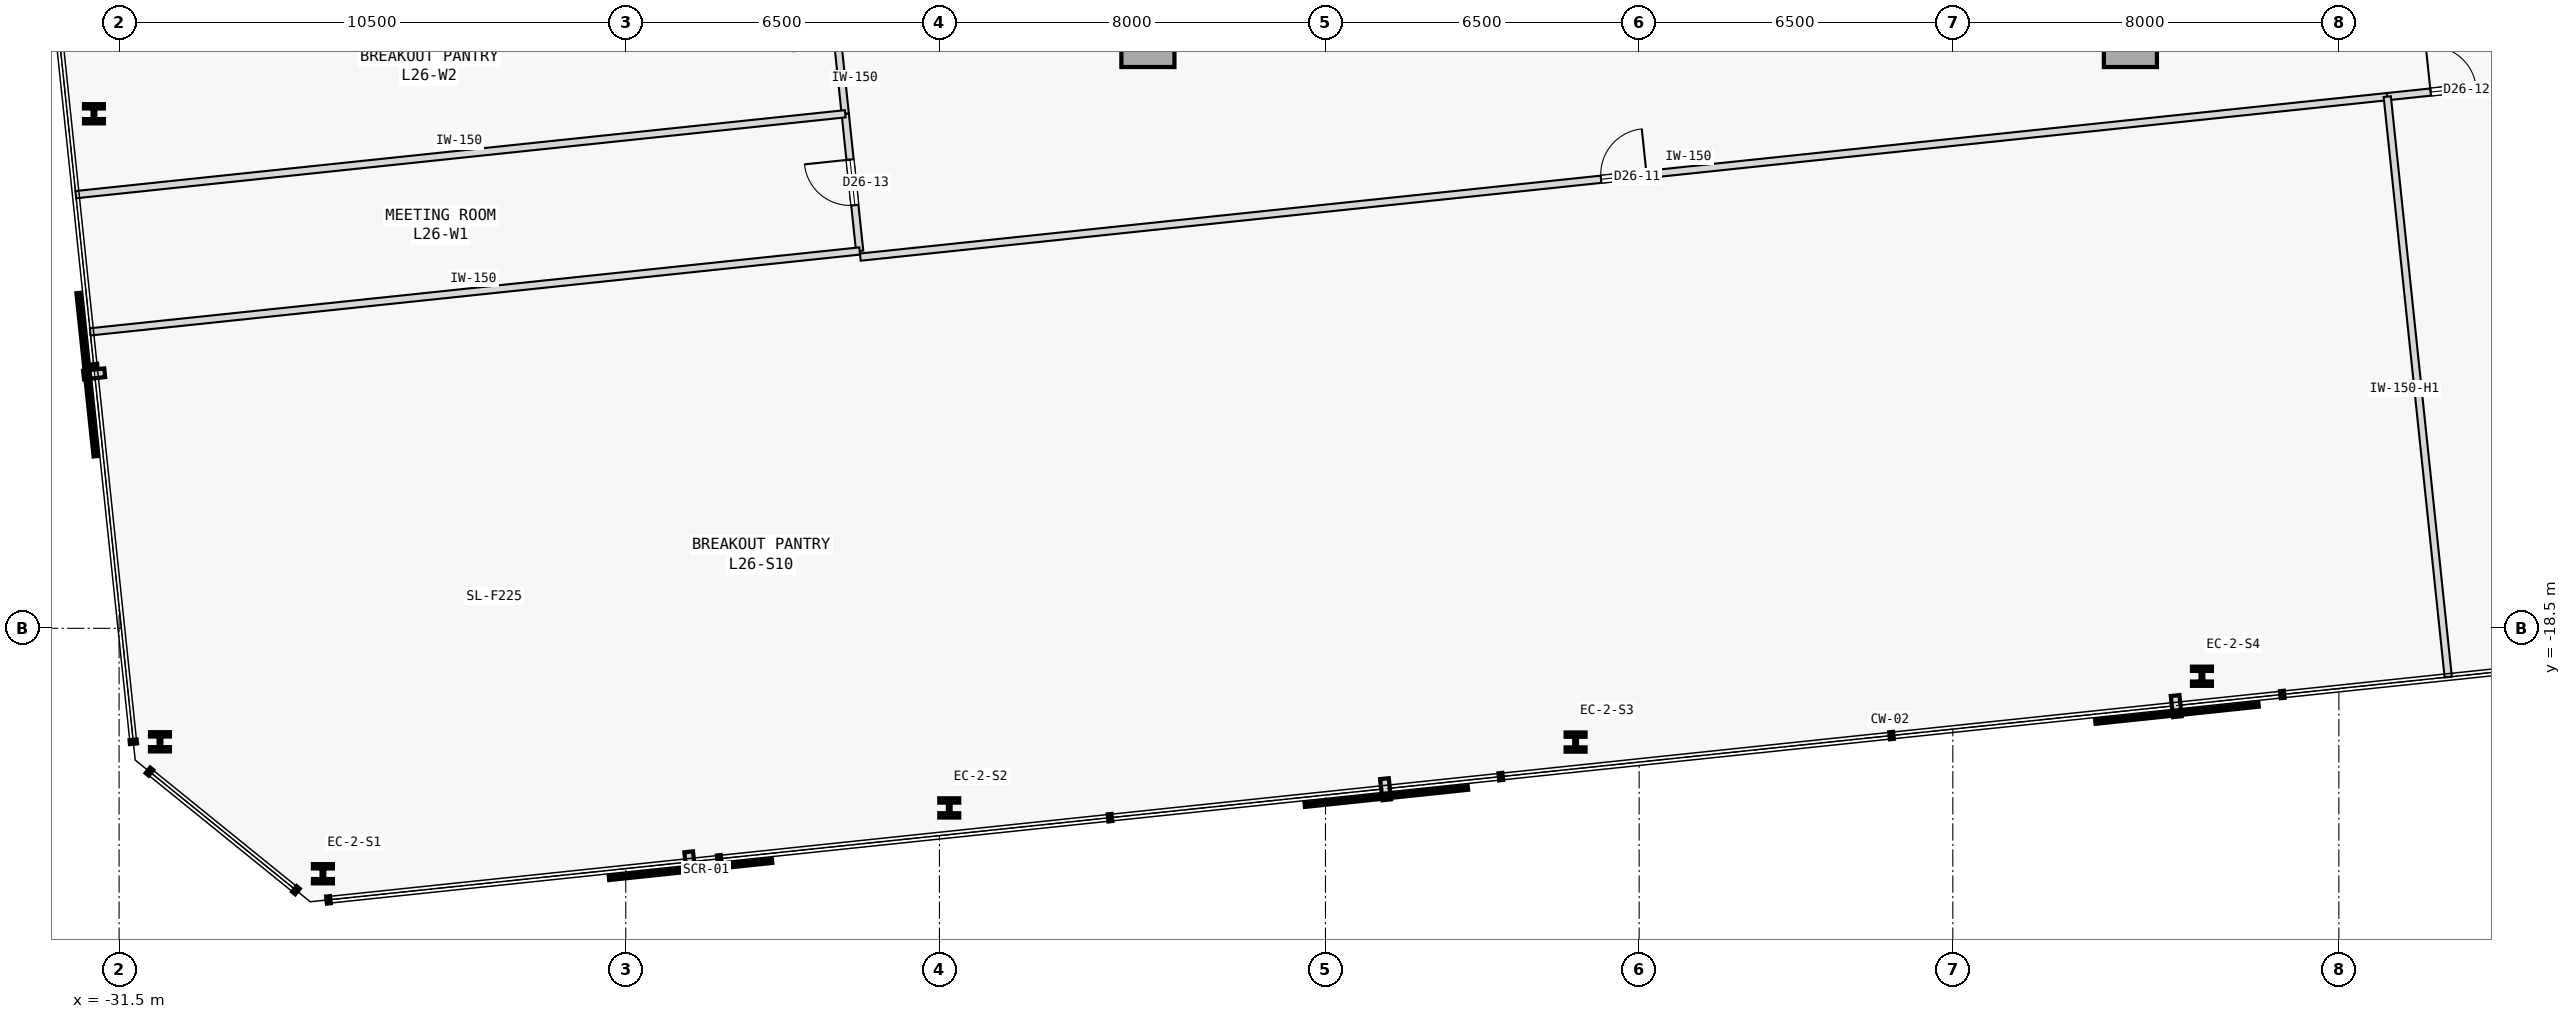
"""IFC4 building model, lengths in metres.
Left out: names, types, materials, properties, quantities, classifications, styles, units other than length and angle.
Written with IfcOpenShell. Run it as: python <this file> out.ifc"""

import sys

from ifc_helpers import new_model, si_unit, direction, frame, frame_2d, origin, origin_2d, place, context, subcontext, project, spatial, rectangle, i_section, extrude, element, fill, save


model = new_model("IFC4")
c1 = context("Model", 3, precision=1e-05, world=origin(), true_north=direction((0.0, 1.0)))
c2 = subcontext(c1, "Body", "Model", "MODEL_VIEW")
j1 = project(units=[si_unit("LENGTHUNIT", "METRE"), si_unit("PLANEANGLEUNIT", "RADIAN")], contexts=[c1])
p1 = place(None, origin())
s1 = spatial("IfcSite", under=j1, at=p1, CompositionType="ELEMENT")
p2 = place(p1, origin())
s2 = spatial("IfcBuilding", under=s1, at=p2, CompositionType="ELEMENT")
p3 = place(p2, frame((0.0, 0.0, 105.9)))
s3 = spatial("IfcBuildingStorey", under=s2, at=p3, CompositionType="ELEMENT", Elevation=105.9)
for number, where, z_axis, x_axis in (
    (1, (-10.18, -6.32, 0.0), (0.0, 0.0, 1.0), (1.0, 0.0, 0.0)),
    (2, (10.18, -6.32, 0.0), (0.0, 0.0, 1.0), (1.0, 0.0, 0.0)),
):
    element("IfcColumn", number, at=place(p3, frame(where, z_axis=z_axis, x_axis=x_axis)), inside=s3, PredefinedType="COLUMN", context=c2, shape_type="SweptSolid", body=[
        extrude(rectangle(XDim=1.1, YDim=1.1, at=origin_2d()), origin(), (0.0, 0.0, 1.0), 3.7),
    ])
for number, where, z_axis, x_axis in (
    (3, (-27.276, -23.586, 0.0), (0.0, 0.0, 1.0), (1.0, 0.0, 0.0)),
    (4, (-14.297, -22.222, 0.0), (0.0, 0.0, 1.0), (1.0, 0.0, 0.0)),
    (5, (-1.317, -20.858, 0.0), (0.0, 0.0, 1.0), (1.0, 0.0, 0.0)),
    (6, (11.663, -19.494, 0.0), (0.0, 0.0, 1.0), (1.0, 0.0, 0.0)),
    (7, (-32.021, -7.838, 0.0), (0.0, 0.0, 1.0), (1.0, 0.0, 0.0)),
    (8, (-30.653, -20.852, 0.0), (0.0, 0.0, 1.0), (1.0, 0.0, 0.0)),
):
    element("IfcColumn", number, at=place(p3, frame(where, z_axis=z_axis, x_axis=x_axis)), inside=s3, PredefinedType="COLUMN", context=c2, shape_type="SweptSolid", body=[
        extrude(i_section(OverallWidth=0.413, OverallDepth=0.398, WebThickness=0.056, FlangeThickness=0.089, FilletRadius=0.015, at=origin_2d()), origin(), (0.0, 0.0, 1.0), 3.7),
    ])
p4 = place(p3, frame((-16.14, -10.809, 0.0), z_axis=(0.0, 0.0, 1.0), x_axis=(0.994522174335, 0.104525809046, 0.0)))
e9 = element("IfcWall", 9, at=p4, inside=s3, PredefinedType="PARTITIONING", context=c2, shape_type="SweptSolid", body=[
    extrude(rectangle(XDim=31.817, YDim=0.15, at=frame_2d((15.908, 0.0))), origin(), (0.0, 0.0, 1.0), 3.475),
])
p5 = place(p4, frame((15.434, 0.0, 0.0)))
e10 = element("IfcOpeningElement", 10, at=p5, cuts=e9, PredefinedType="OPENING", context=c2, shape_type="SweptSolid", body=[
    extrude(rectangle(XDim=0.95, YDim=2.15, at=frame_2d((0.475, 1.075))), frame((0.0, 0.085, 0.0), z_axis=(0.0, -1.0, 0.0), x_axis=(1.0, 0.0, 0.0)), (0.0, 0.0, 1.0), 0.17),
])
p6 = place(p3, frame((15.503, -7.483, 0.0), z_axis=(0.0, 0.0, 1.0), x_axis=(0.994525813133, 0.104491181506, 0.0)))
e11 = element("IfcWall", 11, at=p6, inside=s3, PredefinedType="PARTITIONING", context=c2, shape_type="SweptSolid", body=[
    extrude(rectangle(XDim=2.757, YDim=0.15, at=frame_2d((1.378, 0.0))), origin(), (0.0, 0.0, 1.0), 3.475),
])
p7 = place(p6, frame((0.904, 0.0, 0.0)))
e12 = element("IfcOpeningElement", 12, at=p7, cuts=e11, PredefinedType="OPENING", context=c2, shape_type="SweptSolid", body=[
    extrude(rectangle(XDim=0.95, YDim=2.15, at=frame_2d((0.475, 1.075))), frame((0.0, 0.085, 0.0), z_axis=(0.0, -1.0, 0.0), x_axis=(1.0, 0.0, 0.0)), (0.0, 0.0, 1.0), 0.17),
])
p8 = place(p3, frame((-16.153, -10.682, 0.0), z_axis=(0.0, 0.0, 1.0), x_axis=(-0.104600331874, 0.994514339048, 0.0)))
e13 = element("IfcWall", 13, at=p8, inside=s3, PredefinedType="PARTITIONING", context=c2, shape_type="SweptSolid", body=[
    extrude(rectangle(XDim=2.859, YDim=0.15, at=frame_2d((1.43, 0.0))), origin(), (0.0, 0.0, 1.0), 3.475),
])
p9 = place(p8, frame((0.955, 0.0, 0.0)))
e14 = element("IfcOpeningElement", 14, at=p9, cuts=e13, PredefinedType="OPENING", context=c2, shape_type="SweptSolid", body=[
    extrude(rectangle(XDim=0.95, YDim=2.15, at=frame_2d((0.475, 1.075))), frame((0.0, 0.085, 0.0), z_axis=(0.0, -1.0, 0.0), x_axis=(1.0, 0.0, 0.0)), (0.0, 0.0, 1.0), 0.17),
])
p10 = place(p3, frame((-16.452, -7.838, 0.0), z_axis=(0.0, 0.0, 1.0), x_axis=(-0.104481590513, 0.994526820777, 0.0)))
e15 = element("IfcWall", 15, at=p10, inside=s3, PredefinedType="PARTITIONING", context=c2, shape_type="SweptSolid", body=[
    extrude(rectangle(XDim=3.753, YDim=0.15, at=frame_2d((1.876, 0.0))), origin(), (0.0, 0.0, 1.0), 3.475),
])
p11 = place(p10, frame((1.402, 0.0, 0.0)))
e16 = element("IfcOpeningElement", 16, at=p11, cuts=e15, PredefinedType="OPENING", context=c2, shape_type="SweptSolid", body=[
    extrude(rectangle(XDim=0.95, YDim=2.15, at=frame_2d((0.475, 1.075))), frame((0.0, 0.085, 0.0), z_axis=(0.0, -1.0, 0.0), x_axis=(1.0, 0.0, 0.0)), (0.0, 0.0, 1.0), 0.17),
])
p12 = place(p3, frame((18.231, -7.068, 0.0), z_axis=(0.0, 0.0, 1.0), x_axis=(-0.104536082083, 0.994521094569, 0.0)))
e17 = element("IfcWall", 17, at=p12, inside=s3, PredefinedType="PARTITIONING", context=c2, shape_type="SweptSolid", body=[
    extrude(rectangle(XDim=11.794, YDim=0.15, at=frame_2d((5.897, 0.0))), origin(), (0.0, 0.0, 1.0), 3.475),
])
p13 = place(p12, frame((5.422, 0.0, 0.0)))
e18 = element("IfcOpeningElement", 18, at=p13, cuts=e17, PredefinedType="OPENING", context=c2, shape_type="SweptSolid", body=[
    extrude(rectangle(XDim=0.95, YDim=2.15, at=frame_2d((0.475, 1.075))), frame((0.0, 0.085, 0.0), z_axis=(0.0, -1.0, 0.0), x_axis=(1.0, 0.0, 0.0)), (0.0, 0.0, 1.0), 0.17),
])
p14 = place(p3, frame((16.767, -19.51, 0.0), z_axis=(0.0, 0.0, 1.0), x_axis=(-0.104517685722, 0.994523028075, 0.0)))
e19 = element("IfcWall", 19, at=p14, inside=s3, PredefinedType="PARTITIONING", context=c2, shape_type="SweptSolid", body=[
    extrude(rectangle(XDim=12.093, YDim=0.15, at=frame_2d((6.046, 0.0))), origin(), (0.0, 0.0, 1.0), 3.025),
])
p15 = place(p3, frame((-32.099, -12.358, 0.0), z_axis=(0.0, 0.0, 1.0), x_axis=(0.994522794159, 0.104519911488, 0.0)))
e20 = element("IfcWall", 20, at=p15, inside=s3, PredefinedType="PARTITIONING", context=c2, shape_type="SweptSolid", body=[
    extrude(rectangle(XDim=16.033, YDim=0.15, at=frame_2d((8.017, 0.0))), origin(), (0.0, 0.0, 1.0), 3.475),
])
p16 = place(p3, frame((-32.397, -9.514, 0.0), z_axis=(0.0, 0.0, 1.0), x_axis=(0.994521044813, 0.104536555445, 0.0)))
e21 = element("IfcWall", 21, at=p16, inside=s3, PredefinedType="PARTITIONING", context=c2, shape_type="SweptSolid", body=[
    extrude(rectangle(XDim=16.033, YDim=0.15, at=frame_2d((8.017, 0.0))), origin(), (0.0, 0.0, 1.0), 3.475),
])
p17 = place(p5, origin())
e22 = element("IfcDoor", 22, at=p17, inside=s3, OperationType="SINGLE_SWING_RIGHT", PredefinedType="DOOR", context=c2, shape_type="SweptSolid", body=[
    extrude(rectangle(XDim=0.95, YDim=2.15, at=frame_2d((0.475, 1.075))), frame((0.0, 0.025, 0.0), z_axis=(0.0, -1.0, 0.0), x_axis=(1.0, 0.0, 0.0)), (0.0, 0.0, 1.0), 0.05),
])
fill(e10, e22)
p18 = place(p7, origin())
e23 = element("IfcDoor", 23, at=p18, inside=s3, OperationType="SINGLE_SWING_LEFT", PredefinedType="DOOR", context=c2, shape_type="SweptSolid", body=[
    extrude(rectangle(XDim=0.95, YDim=2.15, at=frame_2d((0.475, 1.075))), frame((0.0, 0.025, 0.0), z_axis=(0.0, -1.0, 0.0), x_axis=(1.0, 0.0, 0.0)), (0.0, 0.0, 1.0), 0.05),
])
fill(e12, e23)
p19 = place(p9, origin())
e24 = element("IfcDoor", 24, at=p19, inside=s3, OperationType="SINGLE_SWING_RIGHT", PredefinedType="DOOR", context=c2, shape_type="SweptSolid", body=[
    extrude(rectangle(XDim=0.95, YDim=2.15, at=frame_2d((0.475, 1.075))), frame((0.0, 0.025, 0.0), z_axis=(0.0, -1.0, 0.0), x_axis=(1.0, 0.0, 0.0)), (0.0, 0.0, 1.0), 0.05),
])
fill(e14, e24)
save(model, sys.argv[1])
